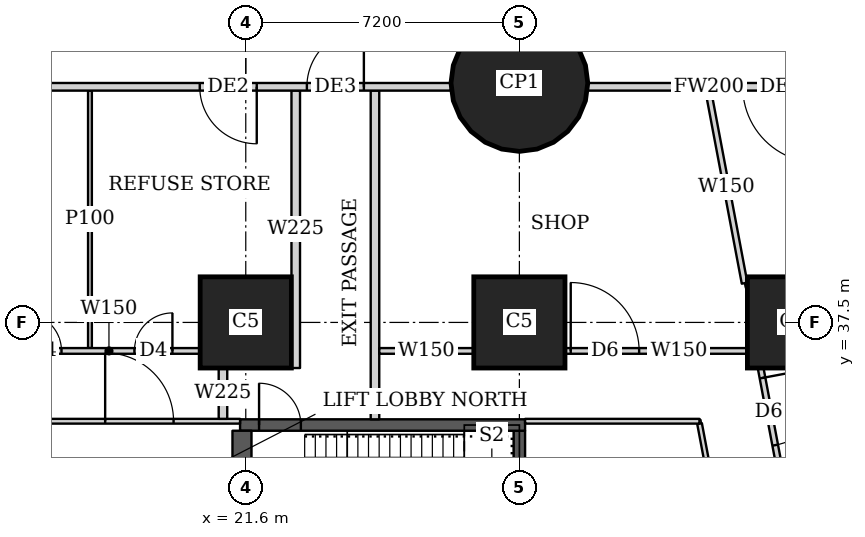
"""IFC4 building model, lengths in metres.
Left out: names, types, materials, properties, quantities, classifications, styles, units other than length and angle.
Written with IfcOpenShell. Run it as: python <this file> out.ifc"""

import sys

from ifc_helpers import new_model, si_unit, direction, frame, frame_2d, origin, origin_2d, place, context, subcontext, project, spatial, rectangle, circle, extrude, element, fill, save


model = new_model("IFC4")
c1 = context("Model", 3, precision=1e-05, world=origin(), true_north=direction((0.0, 1.0)))
c2 = subcontext(c1, "Body", "Model", "MODEL_VIEW")
j1 = project(units=[si_unit("LENGTHUNIT", "METRE"), si_unit("PLANEANGLEUNIT", "RADIAN")], contexts=[c1])
p1 = place(None, origin())
s1 = spatial("IfcSite", under=j1, at=p1, CompositionType="ELEMENT")
p2 = place(p1, origin())
s2 = spatial("IfcBuilding", under=s1, at=p2, CompositionType="ELEMENT")
p3 = place(p2, origin())
s3 = spatial("IfcBuildingStorey", under=s2, at=p3, CompositionType="ELEMENT", Elevation=0.0)
for number, where, z_axis, x_axis in (
    (1, (21.6, 37.5, 0.0), (0.0, 0.0, 1.0), (1.0, 0.0, 0.0)),
    (2, (28.8, 37.5, 0.0), (0.0, 0.0, 1.0), (1.0, 0.0, 0.0)),
    (3, (36.0, 37.5, 0.0), (0.0, 0.0, 1.0), (1.0, 0.0, 0.0)),
):
    element("IfcColumn", number, at=place(p3, frame(where, z_axis=z_axis, x_axis=x_axis)), inside=s3, PredefinedType="COLUMN", context=c2, shape_type="SweptSolid", body=[
        extrude(rectangle(XDim=2.4, YDim=2.4, at=origin_2d()), origin(), (0.0, 0.0, 1.0), 5.6),
    ])
p4 = place(p3, frame((28.8, 43.8, 0.0), z_axis=(0.0, 0.0, 1.0), x_axis=(1.0, 0.0, 0.0)))
e4 = element("IfcColumn", 4, at=p4, inside=s3, PredefinedType="COLUMN", context=c2, shape_type="SweptSolid", body=[
    extrude(circle(Radius=1.8, at=origin_2d()), origin(), (0.0, 0.0, 1.0), 5.6),
])
p5 = place(p3, frame((21.45, 34.8, 0.0), z_axis=(0.0, 0.0, 1.0), x_axis=(1.0, 0.0, 0.0)))
e5 = element("IfcWall", 5, at=p5, inside=s3, PredefinedType="SHEAR", context=c2, shape_type="SweptSolid", body=[
    extrude(rectangle(XDim=7.5, YDim=0.3, at=frame_2d((3.75, 0.0))), origin(), (0.0, 0.0, 1.0), 5.6),
])
p6 = place(p5, frame((0.5, 0.0, 0.0)))
e6 = element("IfcOpeningElement", 6, at=p6, cuts=e5, PredefinedType="OPENING", context=c2, shape_type="SweptSolid", body=[
    extrude(rectangle(XDim=1.1, YDim=2.1, at=frame_2d((0.55, 1.05))), frame((0.0, 0.16, 0.0), z_axis=(0.0, -1.0, 0.0), x_axis=(1.0, 0.0, 0.0)), (0.0, 0.0, 1.0), 0.32),
])
p7 = place(p3, frame((21.5, 30.45, 0.0), z_axis=(0.0, 0.0, 1.0), x_axis=(0.0, 1.0, 0.0)))
e7 = element("IfcWall", 7, at=p7, inside=s3, PredefinedType="SHEAR", context=c2, shape_type="SweptSolid", body=[
    extrude(rectangle(XDim=4.2, YDim=0.5, at=frame_2d((2.1, 0.0))), origin(), (0.0, 0.0, 1.0), 5.6),
])
p8 = place(p3, frame((28.8, 30.45, 0.0), z_axis=(0.0, 0.0, 1.0), x_axis=(0.0, 1.0, 0.0)))
e8 = element("IfcWall", 8, at=p8, inside=s3, PredefinedType="SHEAR", context=c2, shape_type="SweptSolid", body=[
    extrude(rectangle(XDim=4.2, YDim=0.3, at=frame_2d((2.1, 0.0))), origin(), (0.0, 0.0, 1.0), 5.6),
])
p9 = place(p3, frame((36.977, 43.7, 0.0), z_axis=(0.0, 0.0, 1.0), x_axis=(-1.0, 0.0, 0.0)))
e9 = element("IfcWall", 9, at=p9, inside=s3, PredefinedType="SOLIDWALL", context=c2, shape_type="SweptSolid", body=[
    extrude(rectangle(XDim=6.376, YDim=0.2, at=frame_2d((3.188, 0.0))), origin(), (0.0, 0.0, 1.0), 3.5),
])
p10 = place(p9, frame((0.3, 0.0, 0.0)))
e10 = element("IfcOpeningElement", 10, at=p10, cuts=e9, PredefinedType="OPENING", context=c2, shape_type="SweptSolid", body=[
    extrude(rectangle(XDim=2.0, YDim=2.4, at=frame_2d((1.0, 1.2))), frame((0.0, 0.11, 0.0), z_axis=(0.0, -1.0, 0.0), x_axis=(1.0, 0.0, 0.0)), (0.0, 0.0, 1.0), 0.22),
])
p11 = place(p3, frame((26.999, 43.7, 0.0), z_axis=(0.0, 0.0, 1.0), x_axis=(-1.0, 0.0, 0.0)))
e11 = element("IfcWall", 11, at=p11, inside=s3, PredefinedType="SOLIDWALL", context=c2, shape_type="SweptSolid", body=[
    extrude(rectangle(XDim=10.798, YDim=0.2, at=frame_2d((5.399, 0.0))), origin(), (0.0, 0.0, 1.0), 3.5),
])
p12 = place(p11, frame((5.11, 0.0, 0.0)))
e12 = element("IfcOpeningElement", 12, at=p12, cuts=e11, PredefinedType="OPENING", context=c2, shape_type="SweptSolid", body=[
    extrude(rectangle(XDim=1.5, YDim=2.4, at=frame_2d((0.75, 1.2))), frame((0.0, 0.11, 0.0), z_axis=(0.0, -1.0, 0.0), x_axis=(1.0, 0.0, 0.0)), (0.0, 0.0, 1.0), 0.22),
])
p13 = place(p11, frame((2.291, 0.0, 0.0)))
e13 = element("IfcOpeningElement", 13, at=p13, cuts=e11, PredefinedType="OPENING", context=c2, shape_type="SweptSolid", body=[
    extrude(rectangle(XDim=1.5, YDim=2.4, at=frame_2d((0.75, 1.2))), frame((0.0, 0.11, 0.0), z_axis=(0.0, -1.0, 0.0), x_axis=(1.0, 0.0, 0.0)), (0.0, 0.0, 1.0), 0.22),
])
p14 = place(p3, frame((15.601, 36.75, 0.0), z_axis=(0.0, 0.0, 1.0), x_axis=(1.0, 0.0, 0.0)))
e14 = element("IfcWall", 14, at=p14, inside=s3, PredefinedType="SOLIDWALL", context=c2, shape_type="SweptSolid", body=[
    extrude(rectangle(XDim=4.798, YDim=0.15, at=frame_2d((2.399, 0.0))), origin(), (0.0, 0.0, 1.0), 3.7),
])
p15 = place(p14, frame((0.15, 0.0, 0.0)))
e15 = element("IfcOpeningElement", 15, at=p15, cuts=e14, PredefinedType="OPENING", context=c2, shape_type="SweptSolid", body=[
    extrude(rectangle(XDim=1.0, YDim=2.1, at=frame_2d((0.5, 1.05))), frame((0.0, 0.085, 0.0), z_axis=(0.0, -1.0, 0.0), x_axis=(1.0, 0.0, 0.0)), (0.0, 0.0, 1.0), 0.17),
])
p16 = place(p14, frame((3.069, 0.0, 0.0)))
e16 = element("IfcOpeningElement", 16, at=p16, cuts=e14, PredefinedType="OPENING", context=c2, shape_type="SweptSolid", body=[
    extrude(rectangle(XDim=1.0, YDim=2.1, at=frame_2d((0.5, 1.05))), frame((0.0, 0.085, 0.0), z_axis=(0.0, -1.0, 0.0), x_axis=(1.0, 0.0, 0.0)), (0.0, 0.0, 1.0), 0.17),
])
p17 = place(p3, frame((25.113, 36.75, 0.0), z_axis=(0.0, 0.0, 1.0), x_axis=(1.0, 0.0, 0.0)))
e17 = element("IfcWall", 17, at=p17, inside=s3, PredefinedType="SOLIDWALL", context=c2, shape_type="SweptSolid", body=[
    extrude(rectangle(XDim=2.486, YDim=0.15, at=frame_2d((1.243, 0.0))), origin(), (0.0, 0.0, 1.0), 3.7),
])
p18 = place(p3, frame((30.001, 36.75, 0.0), z_axis=(0.0, 0.0, 1.0), x_axis=(1.0, 0.0, 0.0)))
e18 = element("IfcWall", 18, at=p18, inside=s3, PredefinedType="SOLIDWALL", context=c2, shape_type="SweptSolid", body=[
    extrude(rectangle(XDim=4.798, YDim=0.15, at=frame_2d((2.399, 0.0))), origin(), (0.0, 0.0, 1.0), 3.7),
])
p19 = place(p18, frame((0.15, 0.0, 0.0)))
e19 = element("IfcOpeningElement", 19, at=p19, cuts=e18, PredefinedType="OPENING", context=c2, shape_type="SweptSolid", body=[
    extrude(rectangle(XDim=1.8, YDim=2.1, at=frame_2d((0.9, 1.05))), frame((0.0, 0.085, 0.0), z_axis=(0.0, -1.0, 0.0), x_axis=(1.0, 0.0, 0.0)), (0.0, 0.0, 1.0), 0.17),
])
p20 = place(p3, frame((33.769, 43.6, 0.0), z_axis=(0.0, 0.0, 1.0), x_axis=(0.185588997398, -0.98262745944, 0.0)))
e20 = element("IfcWall", 20, at=p20, inside=s3, PredefinedType="SOLIDWALL", context=c2, shape_type="SweptSolid", body=[
    extrude(rectangle(XDim=5.157, YDim=0.15, at=frame_2d((2.578, 0.0))), origin(), (0.0, 0.0, 1.0), 3.5),
])
p21 = place(p3, frame((35.151, 36.285, 0.0), z_axis=(0.0, 0.0, 1.0), x_axis=(0.185575970071, -0.982629919823, 0.0)))
e21 = element("IfcWall", 21, at=p21, inside=s3, PredefinedType="SOLIDWALL", context=c2, shape_type="SweptSolid", body=[
    extrude(rectangle(XDim=33.841, YDim=0.15, at=frame_2d((16.92, 0.0))), origin(), (0.0, 0.0, 1.0), 3.7),
])
p22 = place(p21, frame((0.25, 0.0, 0.0)))
e22 = element("IfcOpeningElement", 22, at=p22, cuts=e21, PredefinedType="OPENING", context=c2, shape_type="SweptSolid", body=[
    extrude(rectangle(XDim=1.8, YDim=2.1, at=frame_2d((0.9, 1.05))), frame((0.0, 0.085, 0.0), z_axis=(0.0, -1.0, 0.0), x_axis=(1.0, 0.0, 0.0)), (0.0, 0.0, 1.0), 0.17),
])
p23 = place(p21, frame((24.261, 0.0, 0.0)))
e23 = element("IfcOpeningElement", 23, at=p23, cuts=e21, PredefinedType="OPENING", context=c2, shape_type="SweptSolid", body=[
    extrude(rectangle(XDim=1.8, YDim=2.1, at=frame_2d((0.9, 1.05))), frame((0.0, 0.085, 0.0), z_axis=(0.0, -1.0, 0.0), x_axis=(1.0, 0.0, 0.0)), (0.0, 0.0, 1.0), 0.17),
])
p24 = place(p3, frame((17.5, 36.825, 0.0), z_axis=(0.0, 0.0, 1.0), x_axis=(0.0, 1.0, 0.0)))
e24 = element("IfcWall", 24, at=p24, inside=s3, PredefinedType="PARTITIONING", context=c2, shape_type="SweptSolid", body=[
    extrude(rectangle(XDim=6.775, YDim=0.1, at=frame_2d((3.388, 0.0))), origin(), (0.0, 0.0, 1.0), 3.5),
])
p25 = place(p3, frame((22.915, 36.3, 0.0), z_axis=(0.0, 0.0, 1.0), x_axis=(0.0, 1.0, 0.0)))
e25 = element("IfcWall", 25, at=p25, inside=s3, PredefinedType="SOLIDWALL", context=c2, shape_type="SweptSolid", body=[
    extrude(rectangle(XDim=7.3, YDim=0.225, at=frame_2d((3.65, 0.0))), origin(), (0.0, 0.0, 1.0), 3.5),
])
p26 = place(p3, frame((25.0, 34.95, 0.0), z_axis=(0.0, 0.0, 1.0), x_axis=(0.0, 1.0, 0.0)))
e26 = element("IfcWall", 26, at=p26, inside=s3, PredefinedType="SOLIDWALL", context=c2, shape_type="SweptSolid", body=[
    extrude(rectangle(XDim=8.65, YDim=0.225, at=frame_2d((4.325, 0.0))), origin(), (0.0, 0.0, 1.0), 3.5),
])
p27 = place(p3, frame((10.163, 34.9, 0.0), z_axis=(0.0, 0.0, 1.0), x_axis=(1.0, 0.0, 0.0)))
e27 = element("IfcWall", 27, at=p27, inside=s3, PredefinedType="PARTITIONING", context=c2, shape_type="SweptSolid", body=[
    extrude(rectangle(XDim=11.287, YDim=0.125, at=frame_2d((5.644, 0.0))), origin(), (0.0, 0.0, 1.0), 3.3),
])
p28 = place(p27, frame((7.737, 0.0, 0.0)))
e28 = element("IfcOpeningElement", 28, at=p28, cuts=e27, PredefinedType="OPENING", context=c2, shape_type="SweptSolid", body=[
    extrude(rectangle(XDim=1.8, YDim=2.1, at=frame_2d((0.9, 1.05))), frame((0.0, 0.073, 0.0), z_axis=(0.0, -1.0, 0.0), x_axis=(1.0, 0.0, 0.0)), (0.0, 0.0, 1.0), 0.145),
])
p29 = place(p3, frame((28.95, 34.9, 0.0), z_axis=(0.0, 0.0, 1.0), x_axis=(1.0, 0.0, 0.0)))
e29 = element("IfcWall", 29, at=p29, inside=s3, PredefinedType="PARTITIONING", context=c2, shape_type="SweptSolid", body=[
    extrude(rectangle(XDim=4.588, YDim=0.125, at=frame_2d((2.294, 0.0))), origin(), (0.0, 0.0, 1.0), 3.3),
])
p30 = place(p3, frame((34.226, 31.213, 0.0), z_axis=(0.0, 0.0, 1.0), x_axis=(-0.185694811189, 0.982607468472, 0.0)))
e30 = element("IfcWall", 30, at=p30, inside=s3, PredefinedType="PARTITIONING", context=c2, shape_type="SweptSolid", body=[
    extrude(rectangle(XDim=3.689, YDim=0.125, at=frame_2d((1.845, 0.0))), origin(), (0.0, 0.0, 1.0), 5.3),
])
p31 = place(p30, frame((0.25, 0.0, 0.0)))
e31 = element("IfcOpeningElement", 31, at=p31, cuts=e30, PredefinedType="OPENING", context=c2, shape_type="SweptSolid", body=[
    extrude(rectangle(XDim=1.0, YDim=2.1, at=frame_2d((0.5, 1.05))), frame((0.0, 0.073, 0.0), z_axis=(0.0, -1.0, 0.0), x_axis=(1.0, 0.0, 0.0)), (0.0, 0.0, 1.0), 0.145),
])
p32 = place(p3, frame((21.0, 34.963, 0.0), z_axis=(0.0, 0.0, 1.0), x_axis=(0.0, 1.0, 0.0)))
e32 = element("IfcWall", 32, at=p32, inside=s3, PredefinedType="SOLIDWALL", context=c2, shape_type="SweptSolid", body=[
    extrude(rectangle(XDim=1.337, YDim=0.225, at=frame_2d((0.668, 0.0))), origin(), (0.0, 0.0, 1.0), 3.3),
])
p33 = place(p10, origin())
e33 = element("IfcDoor", 33, at=p33, inside=s3, OperationType="DOUBLE_DOOR_SINGLE_SWING", PredefinedType="DOOR", context=c2, shape_type="SweptSolid", body=[
    extrude(rectangle(XDim=2.0, YDim=2.4, at=frame_2d((1.0, 1.2))), frame((0.0, 0.025, 0.0), z_axis=(0.0, -1.0, 0.0), x_axis=(1.0, 0.0, 0.0)), (0.0, 0.0, 1.0), 0.05),
])
fill(e10, e33)
p34 = place(p12, origin())
e34 = element("IfcDoor", 34, at=p34, inside=s3, OperationType="DOUBLE_DOOR_SINGLE_SWING", PredefinedType="DOOR", context=c2, shape_type="SweptSolid", body=[
    extrude(rectangle(XDim=1.5, YDim=2.4, at=frame_2d((0.75, 1.2))), frame((0.0, 0.025, 0.0), z_axis=(0.0, -1.0, 0.0), x_axis=(1.0, 0.0, 0.0)), (0.0, 0.0, 1.0), 0.05),
])
fill(e12, e34)
p35 = place(p13, frame((1.5, 0.0, 0.0), z_axis=(0.0, 0.0, 1.0), x_axis=(-1.0, 0.0, 0.0)))
e35 = element("IfcDoor", 35, at=p35, inside=s3, OperationType="DOUBLE_DOOR_SINGLE_SWING", PredefinedType="DOOR", context=c2, shape_type="SweptSolid", body=[
    extrude(rectangle(XDim=1.5, YDim=2.4, at=frame_2d((0.75, 1.2))), frame((0.0, 0.025, 0.0), z_axis=(0.0, -1.0, 0.0), x_axis=(1.0, 0.0, 0.0)), (0.0, 0.0, 1.0), 0.05),
])
fill(e13, e35)
p36 = place(p15, origin())
e36 = element("IfcDoor", 36, at=p36, inside=s3, OperationType="SINGLE_SWING_LEFT", PredefinedType="DOOR", context=c2, shape_type="SweptSolid", body=[
    extrude(rectangle(XDim=1.0, YDim=2.1, at=frame_2d((0.5, 1.05))), frame((0.0, 0.025, 0.0), z_axis=(0.0, -1.0, 0.0), x_axis=(1.0, 0.0, 0.0)), (0.0, 0.0, 1.0), 0.05),
])
fill(e15, e36)
p37 = place(p16, origin())
e37 = element("IfcDoor", 37, at=p37, inside=s3, OperationType="SINGLE_SWING_RIGHT", PredefinedType="DOOR", context=c2, shape_type="SweptSolid", body=[
    extrude(rectangle(XDim=1.0, YDim=2.1, at=frame_2d((0.5, 1.05))), frame((0.0, 0.025, 0.0), z_axis=(0.0, -1.0, 0.0), x_axis=(1.0, 0.0, 0.0)), (0.0, 0.0, 1.0), 0.05),
])
fill(e16, e37)
p38 = place(p19, origin())
e38 = element("IfcDoor", 38, at=p38, inside=s3, OperationType="DOUBLE_DOOR_SINGLE_SWING", PredefinedType="DOOR", context=c2, shape_type="SweptSolid", body=[
    extrude(rectangle(XDim=1.8, YDim=2.1, at=frame_2d((0.9, 1.05))), frame((0.0, 0.025, 0.0), z_axis=(0.0, -1.0, 0.0), x_axis=(1.0, 0.0, 0.0)), (0.0, 0.0, 1.0), 0.05),
])
fill(e19, e38)
p39 = place(p22, origin())
e39 = element("IfcDoor", 39, at=p39, inside=s3, OperationType="DOUBLE_DOOR_SINGLE_SWING", PredefinedType="DOOR", context=c2, shape_type="SweptSolid", body=[
    extrude(rectangle(XDim=1.8, YDim=2.1, at=frame_2d((0.9, 1.05))), frame((0.0, 0.025, 0.0), z_axis=(0.0, -1.0, 0.0), x_axis=(1.0, 0.0, 0.0)), (0.0, 0.0, 1.0), 0.05),
])
fill(e22, e39)
p40 = place(p28, origin())
e40 = element("IfcDoor", 40, at=p40, inside=s3, OperationType="DOUBLE_DOOR_SINGLE_SWING", PredefinedType="DOOR", context=c2, shape_type="SweptSolid", body=[
    extrude(rectangle(XDim=1.8, YDim=2.1, at=frame_2d((0.9, 1.05))), frame((0.0, 0.025, 0.0), z_axis=(0.0, -1.0, 0.0), x_axis=(1.0, 0.0, 0.0)), (0.0, 0.0, 1.0), 0.05),
])
fill(e28, e40)
p41 = place(p6, origin())
e41 = element("IfcDoor", 41, at=p41, inside=s3, OperationType="SINGLE_SWING_LEFT", PredefinedType="DOOR", context=c2, shape_type="SweptSolid", body=[
    extrude(rectangle(XDim=1.1, YDim=2.1, at=frame_2d((0.55, 1.05))), frame((0.0, 0.025, 0.0), z_axis=(0.0, -1.0, 0.0), x_axis=(1.0, 0.0, 0.0)), (0.0, 0.0, 1.0), 0.05),
])
fill(e6, e41)
save(model, sys.argv[1])
